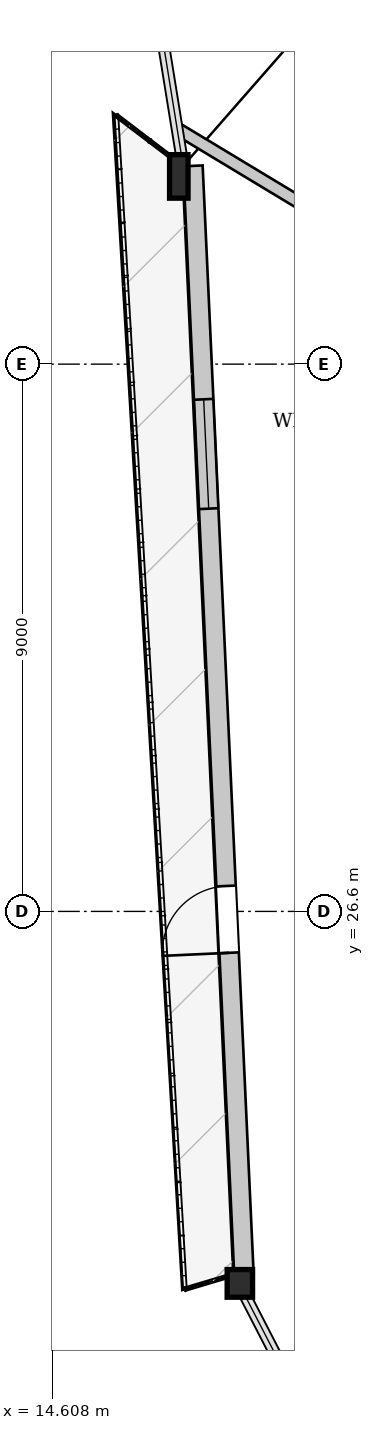
"""IFC4 building model, lengths in metres.
Left out: names, types, materials, properties, quantities, classifications, styles, units other than length and angle.
Written with IfcOpenShell. Run it as: python <this file> out.ifc"""

import sys

from ifc_helpers import new_model, si_unit, direction, frame, frame_2d, origin, origin_2d, place, context, subcontext, project, spatial, rectangle, i_section, extrude, source, transform, mapped, element, fill, save


model = new_model("IFC4")
c1 = context("Model", 3, precision=1e-05, world=origin(), true_north=direction((0.0, 1.0)))
c2 = subcontext(c1, "Body", "Model", "MODEL_VIEW")
j1 = project(units=[si_unit("LENGTHUNIT", "METRE"), si_unit("PLANEANGLEUNIT", "RADIAN")], contexts=[c1])
p1 = place(None, origin())
s1 = spatial("IfcSite", under=j1, at=p1, CompositionType="ELEMENT")
p2 = place(p1, origin())
s2 = spatial("IfcBuilding", under=s1, at=p2, CompositionType="ELEMENT")
p3 = place(p2, frame((0.0, 0.0, 102.15)))
s3 = spatial("IfcBuildingStorey", under=s2, at=p3, CompositionType="ELEMENT", Elevation=102.15)
m1 = source(origin(), c2, "Body", "SweptSolid", [
    extrude(i_section(OverallWidth=0.304, OverallDepth=0.716, WebThickness=0.021, FlangeThickness=0.04, at=origin_2d()), origin(), (0.0, 0.0, 1.0), 3.404),
])
p4 = place(p3, frame((16.764, 38.853, 0.0), z_axis=(-0.042670244367, -0.097460272428, 0.994324265793), x_axis=(0.916049009684, -0.40106634346, 0.0)))
e1 = element("IfcColumn", 1, at=p4, inside=s3, PredefinedType="COLUMN", context=c2, shape_type="MappedRepresentation", body=[
    mapped(m1, transform((0.0, 0.0, 0.0), x_axis=(1.0, 0.0, 0.0), y_axis=(0.0, 1.0, 0.0), z_axis=(0.0, 0.0, 1.0), scale=1.0)),
])
m2 = source(origin(), c2, "Body", "SweptSolid", [
    extrude(i_section(OverallWidth=0.418, OverallDepth=0.455, WebThickness=0.038, FlangeThickness=0.059, at=origin_2d()), origin(), (0.0, 0.0, 1.0), 3.403),
])
p5 = place(p3, frame((17.602, 20.629, 0.0), z_axis=(0.054886883003, -0.086025323818, 0.99477991221), x_axis=(0.843023962801, 0.537876006291, 0.0)))
e2 = element("IfcColumn", 2, at=p5, inside=s3, PredefinedType="COLUMN", context=c2, shape_type="MappedRepresentation", body=[
    mapped(m2, transform((0.0, 0.0, 0.0), x_axis=(1.0, 0.0, 0.0), y_axis=(0.0, 1.0, 0.0), z_axis=(0.0, 0.0, 1.0), scale=1.0)),
])
p6 = place(p3, frame((17.762, 20.637, 0.0), z_axis=(0.0, 0.0, 1.0), x_axis=(-0.04595581603, 0.998943473362, 0.0)))
e3 = element("IfcWall", 3, at=p6, inside=s3, PredefinedType="SOLIDWALL", context=c2, shape_type="SweptSolid", body=[
    extrude(rectangle(XDim=18.243, YDim=0.32, at=frame_2d((9.122, 0.0))), origin(), (0.0, 0.0, 1.0), 2.692),
])
p7 = place(p6, frame((5.288, 0.0, 0.0)))
e4 = element("IfcOpeningElement", 4, at=p7, cuts=e3, PredefinedType="OPENING", context=c2, shape_type="SweptSolid", body=[
    extrude(rectangle(XDim=1.1, YDim=2.3, at=frame_2d((0.55, 1.15))), frame((0.0, 0.17, 0.0), z_axis=(0.0, -1.0, 0.0), x_axis=(1.0, 0.0, 0.0)), (0.0, 0.0, 1.0), 0.34),
])
p8 = place(p6, frame((12.6, 0.0, 0.372)))
e5 = element("IfcOpeningElement", 5, at=p8, cuts=e3, PredefinedType="OPENING", context=c2, shape_type="SweptSolid", body=[
    extrude(rectangle(XDim=1.8, YDim=2.2, at=frame_2d((0.9, 1.1))), frame((0.0, 0.17, 0.0), z_axis=(0.0, -1.0, 0.0), x_axis=(1.0, 0.0, 0.0)), (0.0, 0.0, 1.0), 0.34),
])
p9 = place(p3, frame((27.45, 32.964, 0.0), z_axis=(0.0, 0.0, 1.0), x_axis=(-0.856263872534, 0.516538653533, 0.0)))
e6 = element("IfcWall", 6, at=p9, inside=s3, PredefinedType="PARTITIONING", context=c2, shape_type="SweptSolid", body=[
    extrude(rectangle(XDim=12.557, YDim=0.2, at=frame_2d((6.278, 0.0))), origin(), (0.0, 0.0, 1.0), 3.3),
])
m3 = source(origin(), c2, "Body", "SweptSolid", [
    extrude(rectangle(XDim=1.1, YDim=2.3, at=frame_2d((0.55, 1.15))), frame((0.0, 0.025, 0.0), z_axis=(0.0, -1.0, 0.0), x_axis=(1.0, 0.0, 0.0)), (0.0, 0.0, 1.0), 0.05),
])
p10 = place(p7, origin())
e7 = element("IfcDoor", 7, at=p10, inside=s3, OperationType="SINGLE_SWING_LEFT", PredefinedType="DOOR", context=c2, shape_type="MappedRepresentation", body=[
    mapped(m3, transform((0.0, 0.0, 0.0), x_axis=(1.0, 0.0, 0.0), y_axis=(0.0, 1.0, 0.0), z_axis=(0.0, 0.0, 1.0), scale=1.0)),
])
fill(e4, e7)
m4 = source(origin(), c2, "Body", "SweptSolid", [
    extrude(rectangle(XDim=1.8, YDim=2.2, at=frame_2d((0.9, 1.1))), frame((0.0, 0.03, 0.0), z_axis=(0.0, -1.0, 0.0), x_axis=(1.0, 0.0, 0.0)), (0.0, 0.0, 1.0), 0.06),
])
p11 = place(p8, origin())
e8 = element("IfcWindow", 8, at=p11, inside=s3, PartitioningType="SINGLE_PANEL", PredefinedType="WINDOW", context=c2, shape_type="MappedRepresentation", body=[
    mapped(m4, transform((0.0, 0.0, 0.0), x_axis=(1.0, 0.0, 0.0), y_axis=(0.0, 1.0, 0.0), z_axis=(0.0, 0.0, 1.0), scale=1.0)),
])
fill(e5, e8)
save(model, sys.argv[1])
